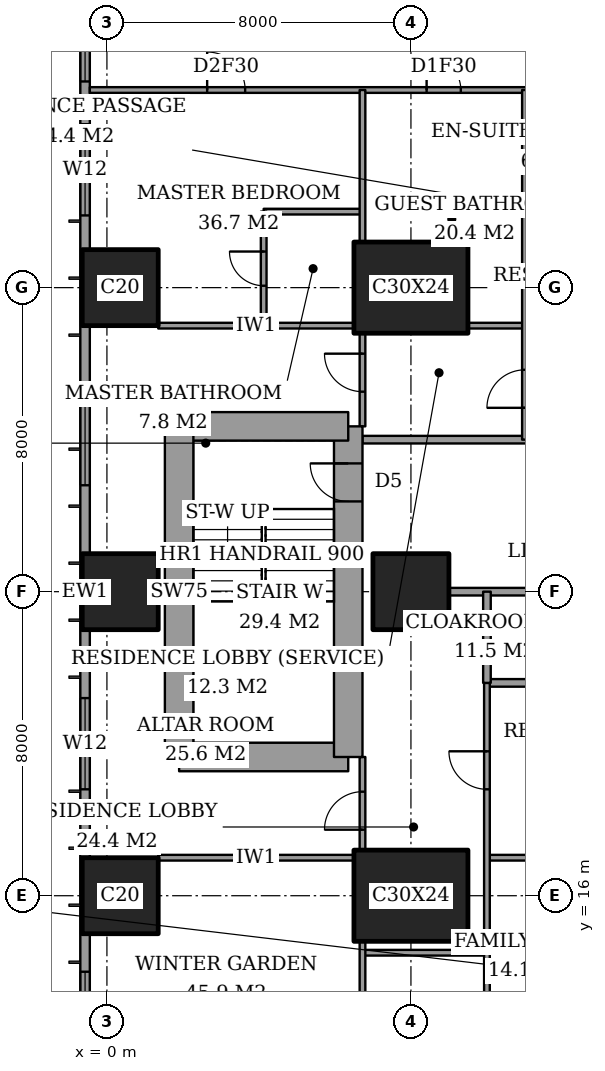
"""IFC4 building model, lengths in metres.
Left out: names, types, materials, properties, quantities, classifications, styles, units other than length and angle.
Written with IfcOpenShell. Run it as: python <this file> out.ifc"""

import sys

from ifc_helpers import new_model, si_unit, direction, frame, frame_2d, origin, origin_2d, place, context, subcontext, project, spatial, rectangle, extrude, element, fill, save


model = new_model("IFC4")
c1 = context("Model", 3, precision=1e-05, world=origin(), true_north=direction((0.0, 1.0)))
c2 = subcontext(c1, "Body", "Model", "MODEL_VIEW")
j1 = project(units=[si_unit("LENGTHUNIT", "METRE"), si_unit("PLANEANGLEUNIT", "RADIAN")], contexts=[c1])
p1 = place(None, origin())
s1 = spatial("IfcSite", under=j1, at=p1, CompositionType="ELEMENT")
p2 = place(p1, origin())
s2 = spatial("IfcBuilding", under=s1, at=p2, CompositionType="ELEMENT")
p3 = place(p2, frame((0.0, 0.0, 128.6)))
s3 = spatial("IfcBuildingStorey", under=s2, at=p3, CompositionType="ELEMENT", Elevation=128.6)
for number, where, z_axis, x_axis in (
    (1, (0.35, 16.0, 0.0), (0.0, 0.0, 1.0), (1.0, 0.0, 0.0)),
    (2, (0.35, 24.0, 0.0), (0.0, 0.0, 1.0), (1.0, 0.0, 0.0)),
    (3, (0.35, 32.0, 0.0), (0.0, 0.0, 1.0), (1.0, 0.0, 0.0)),
):
    element("IfcColumn", number, at=place(p3, frame(where, z_axis=z_axis, x_axis=x_axis)), inside=s3, PredefinedType="COLUMN", context=c2, shape_type="SweptSolid", body=[
        extrude(rectangle(XDim=2.0, YDim=2.0, at=origin_2d()), origin(), (0.0, 0.0, 1.0), 3.6),
    ])
p4 = place(p3, frame((8.0, 16.0, 0.0), z_axis=(0.0, 0.0, 1.0), x_axis=(1.0, 0.0, 0.0)))
e4 = element("IfcColumn", 4, at=p4, inside=s3, PredefinedType="COLUMN", context=c2, shape_type="SweptSolid", body=[
    extrude(rectangle(XDim=3.0, YDim=2.4, at=origin_2d()), origin(), (0.0, 0.0, 1.0), 3.6),
])
p5 = place(p3, frame((8.0, 24.0, 0.0), z_axis=(0.0, 0.0, 1.0), x_axis=(1.0, 0.0, 0.0)))
e5 = element("IfcColumn", 5, at=p5, inside=s3, PredefinedType="COLUMN", context=c2, shape_type="SweptSolid", body=[
    extrude(rectangle(XDim=2.0, YDim=2.0, at=origin_2d()), origin(), (0.0, 0.0, 1.0), 3.6),
])
p6 = place(p3, frame((8.0, 32.0, 0.0), z_axis=(0.0, 0.0, 1.0), x_axis=(1.0, 0.0, 0.0)))
e6 = element("IfcColumn", 6, at=p6, inside=s3, PredefinedType="COLUMN", context=c2, shape_type="SweptSolid", body=[
    extrude(rectangle(XDim=3.0, YDim=2.4, at=origin_2d()), origin(), (0.0, 0.0, 1.0), 3.6),
])
p7 = place(p3, frame((1.9, 19.65, 0.0), z_axis=(0.0, 0.0, 1.0), x_axis=(1.0, 0.0, 0.0)))
e7 = element("IfcWall", 7, at=p7, inside=s3, PredefinedType="SHEAR", context=c2, shape_type="SweptSolid", body=[
    extrude(rectangle(XDim=4.45, YDim=0.75, at=frame_2d((2.225, 0.0))), origin(), (0.0, 0.0, 1.0), 3.6),
])
p8 = place(p3, frame((6.35, 19.65, 0.0), z_axis=(0.0, 0.0, 1.0), x_axis=(0.0, 1.0, 0.0)))
e8 = element("IfcWall", 8, at=p8, inside=s3, PredefinedType="SHEAR", context=c2, shape_type="SweptSolid", body=[
    extrude(rectangle(XDim=8.7, YDim=0.75, at=frame_2d((4.35, 0.0))), origin(), (0.0, 0.0, 1.0), 3.6),
])
p9 = place(p8, frame((6.725, 0.0, 0.0)))
e9 = element("IfcOpeningElement", 9, at=p9, cuts=e8, PredefinedType="OPENING", context=c2, shape_type="SweptSolid", body=[
    extrude(rectangle(XDim=1.0, YDim=2.1, at=frame_2d((0.5, 1.05))), frame((0.0, 0.385, 0.0), z_axis=(0.0, -1.0, 0.0), x_axis=(1.0, 0.0, 0.0)), (0.0, 0.0, 1.0), 0.77),
])
p10 = place(p3, frame((6.35, 28.35, 0.0), z_axis=(0.0, 0.0, 1.0), x_axis=(-1.0, 0.0, 0.0)))
e10 = element("IfcWall", 10, at=p10, inside=s3, PredefinedType="SHEAR", context=c2, shape_type="SweptSolid", body=[
    extrude(rectangle(XDim=4.45, YDim=0.75, at=frame_2d((2.225, 0.0))), origin(), (0.0, 0.0, 1.0), 3.6),
])
p11 = place(p3, frame((1.9, 28.35, 0.0), z_axis=(0.0, 0.0, 1.0), x_axis=(0.0, -1.0, 0.0)))
e11 = element("IfcWall", 11, at=p11, inside=s3, PredefinedType="SHEAR", context=c2, shape_type="SweptSolid", body=[
    extrude(rectangle(XDim=8.7, YDim=0.75, at=frame_2d((4.35, 0.0))), origin(), (0.0, 0.0, 1.0), 3.6),
])
p12 = place(p3, frame((-0.575, 44.825, 0.0), z_axis=(0.0, 0.0, 1.0), x_axis=(0.0, -1.0, 0.0)))
e12 = element("IfcWall", 12, at=p12, inside=s3, PredefinedType="SOLIDWALL", context=c2, shape_type="SweptSolid", body=[
    extrude(rectangle(XDim=41.65, YDim=0.25, at=frame_2d((20.825, 0.0))), origin(), (0.0, 0.0, 1.0), 3.6),
])
p13 = place(p12, frame((0.775, 0.0, 0.4)))
e13 = element("IfcOpeningElement", 13, at=p13, cuts=e12, PredefinedType="OPENING", context=c2, shape_type="SweptSolid", body=[
    extrude(rectangle(XDim=2.4, YDim=2.2, at=frame_2d((1.2, 1.1))), frame((0.0, 0.135, 0.0), z_axis=(0.0, -1.0, 0.0), x_axis=(1.0, 0.0, 0.0)), (0.0, 0.0, 1.0), 0.27),
])
p14 = place(p12, frame((6.2, 0.0, 0.4)))
e14 = element("IfcOpeningElement", 14, at=p14, cuts=e12, PredefinedType="OPENING", context=c2, shape_type="SweptSolid", body=[
    extrude(rectangle(XDim=1.2, YDim=2.2, at=frame_2d((0.6, 1.1))), frame((0.0, 0.135, 0.0), z_axis=(0.0, -1.0, 0.0), x_axis=(1.0, 0.0, 0.0)), (0.0, 0.0, 1.0), 0.27),
])
p15 = place(p12, frame((8.525, 0.0, 0.4)))
e15 = element("IfcOpeningElement", 15, at=p15, cuts=e12, PredefinedType="OPENING", context=c2, shape_type="SweptSolid", body=[
    extrude(rectangle(XDim=2.4, YDim=2.2, at=frame_2d((1.2, 1.1))), frame((0.0, 0.135, 0.0), z_axis=(0.0, -1.0, 0.0), x_axis=(1.0, 0.0, 0.0)), (0.0, 0.0, 1.0), 0.27),
])
p16 = place(p12, frame((15.625, 0.0, 0.4)))
e16 = element("IfcOpeningElement", 16, at=p16, cuts=e12, PredefinedType="OPENING", context=c2, shape_type="SweptSolid", body=[
    extrude(rectangle(XDim=2.4, YDim=2.2, at=frame_2d((1.2, 1.1))), frame((0.0, 0.135, 0.0), z_axis=(0.0, -1.0, 0.0), x_axis=(1.0, 0.0, 0.0)), (0.0, 0.0, 1.0), 0.27),
])
p17 = place(p12, frame((23.625, 0.0, 0.4)))
e17 = element("IfcOpeningElement", 17, at=p17, cuts=e12, PredefinedType="OPENING", context=c2, shape_type="SweptSolid", body=[
    extrude(rectangle(XDim=2.4, YDim=2.2, at=frame_2d((1.2, 1.1))), frame((0.0, 0.135, 0.0), z_axis=(0.0, -1.0, 0.0), x_axis=(1.0, 0.0, 0.0)), (0.0, 0.0, 1.0), 0.27),
])
p18 = place(p12, frame((30.825, 0.0, 0.4)))
e18 = element("IfcOpeningElement", 18, at=p18, cuts=e12, PredefinedType="OPENING", context=c2, shape_type="SweptSolid", body=[
    extrude(rectangle(XDim=2.4, YDim=2.2, at=frame_2d((1.2, 1.1))), frame((0.0, 0.135, 0.0), z_axis=(0.0, -1.0, 0.0), x_axis=(1.0, 0.0, 0.0)), (0.0, 0.0, 1.0), 0.27),
])
p19 = place(p12, frame((34.5, 0.0, 0.4)))
e19 = element("IfcOpeningElement", 19, at=p19, cuts=e12, PredefinedType="OPENING", context=c2, shape_type="SweptSolid", body=[
    extrude(rectangle(XDim=1.2, YDim=2.2, at=frame_2d((0.6, 1.1))), frame((0.0, 0.135, 0.0), z_axis=(0.0, -1.0, 0.0), x_axis=(1.0, 0.0, 0.0)), (0.0, 0.0, 1.0), 0.27),
])
p20 = place(p12, frame((38.475, 0.0, 0.4)))
e20 = element("IfcOpeningElement", 20, at=p20, cuts=e12, PredefinedType="OPENING", context=c2, shape_type="SweptSolid", body=[
    extrude(rectangle(XDim=2.4, YDim=2.2, at=frame_2d((1.2, 1.1))), frame((0.0, 0.135, 0.0), z_axis=(0.0, -1.0, 0.0), x_axis=(1.0, 0.0, 0.0)), (0.0, 0.0, 1.0), 0.27),
])
p21 = place(p3, frame((6.725, 14.5, 0.0), z_axis=(0.0, 0.0, 1.0), x_axis=(1.0, 0.0, 0.0)))
e21 = element("IfcWall", 21, at=p21, inside=s3, PredefinedType="PARTITIONING", context=c2, shape_type="SweptSolid", body=[
    extrude(rectangle(XDim=3.275, YDim=0.15, at=frame_2d((1.637, 0.0))), origin(), (0.0, 0.0, 1.0), 3.35),
])
p22 = place(p3, frame((1.35, 17.0, 0.0), z_axis=(0.0, 0.0, 1.0), x_axis=(1.0, 0.0, 0.0)))
e22 = element("IfcWall", 22, at=p22, inside=s3, PredefinedType="PARTITIONING", context=c2, shape_type="SweptSolid", body=[
    extrude(rectangle(XDim=5.15, YDim=0.15, at=frame_2d((2.575, 0.0))), origin(), (0.0, 0.0, 1.0), 3.35),
])
p23 = place(p3, frame((10.0, 17.0, 0.0), z_axis=(0.0, 0.0, 1.0), x_axis=(1.0, 0.0, 0.0)))
e23 = element("IfcWall", 23, at=p23, inside=s3, PredefinedType="PARTITIONING", context=c2, shape_type="SweptSolid", body=[
    extrude(rectangle(XDim=4.4, YDim=0.15, at=frame_2d((2.2, 0.0))), origin(), (0.0, 0.0, 1.0), 3.35),
])
p24 = place(p23, frame((2.8, 0.0, 0.0)))
e24 = element("IfcOpeningElement", 24, at=p24, cuts=e23, PredefinedType="OPENING", context=c2, shape_type="SweptSolid", body=[
    extrude(rectangle(XDim=1.0, YDim=2.1, at=frame_2d((0.5, 1.05))), frame((0.0, 0.085, 0.0), z_axis=(0.0, -1.0, 0.0), x_axis=(1.0, 0.0, 0.0)), (0.0, 0.0, 1.0), 0.17),
])
p25 = place(p3, frame((10.0, 21.6, 0.0), z_axis=(0.0, 0.0, 1.0), x_axis=(1.0, 0.0, 0.0)))
e25 = element("IfcWall", 25, at=p25, inside=s3, PredefinedType="PARTITIONING", context=c2, shape_type="SweptSolid", body=[
    extrude(rectangle(XDim=4.8, YDim=0.2, at=frame_2d((2.4, 0.0))), origin(), (0.0, 0.0, 1.0), 3.35),
])
p26 = place(p25, frame((1.95, 0.0, 0.0)))
e26 = element("IfcOpeningElement", 26, at=p26, cuts=e25, PredefinedType="OPENING", context=c2, shape_type="SweptSolid", body=[
    extrude(rectangle(XDim=0.9, YDim=2.1, at=frame_2d((0.45, 1.05))), frame((0.0, 0.11, 0.0), z_axis=(0.0, -1.0, 0.0), x_axis=(1.0, 0.0, 0.0)), (0.0, 0.0, 1.0), 0.22),
])
p27 = place(p3, frame((9.0, 24.0, 0.0), z_axis=(0.0, 0.0, 1.0), x_axis=(1.0, 0.0, 0.0)))
e27 = element("IfcWall", 27, at=p27, inside=s3, PredefinedType="PARTITIONING", context=c2, shape_type="SweptSolid", body=[
    extrude(rectangle(XDim=6.0, YDim=0.2, at=frame_2d((3.0, 0.0))), origin(), (0.0, 0.0, 1.0), 3.35),
])
p28 = place(p3, frame((6.725, 28.0, 0.0), z_axis=(0.0, 0.0, 1.0), x_axis=(1.0, 0.0, 0.0)))
e28 = element("IfcWall", 28, at=p28, inside=s3, PredefinedType="PARTITIONING", context=c2, shape_type="SweptSolid", body=[
    extrude(rectangle(XDim=17.275, YDim=0.2, at=frame_2d((8.637, 0.0))), origin(), (0.0, 0.0, 1.0), 3.35),
])
p29 = place(p28, frame((7.175, 0.0, 0.0)))
e29 = element("IfcOpeningElement", 29, at=p29, cuts=e28, PredefinedType="OPENING", context=c2, shape_type="SweptSolid", body=[
    extrude(rectangle(XDim=1.2, YDim=2.4, at=frame_2d((0.6, 1.2))), frame((0.0, 0.11, 0.0), z_axis=(0.0, -1.0, 0.0), x_axis=(1.0, 0.0, 0.0)), (0.0, 0.0, 1.0), 0.22),
])
p30 = place(p3, frame((1.35, 31.0, 0.0), z_axis=(0.0, 0.0, 1.0), x_axis=(1.0, 0.0, 0.0)))
e30 = element("IfcWall", 30, at=p30, inside=s3, PredefinedType="PARTITIONING", context=c2, shape_type="SweptSolid", body=[
    extrude(rectangle(XDim=5.15, YDim=0.15, at=frame_2d((2.575, 0.0))), origin(), (0.0, 0.0, 1.0), 3.35),
])
p31 = place(p3, frame((9.5, 31.0, 0.0), z_axis=(0.0, 0.0, 1.0), x_axis=(1.0, 0.0, 0.0)))
e31 = element("IfcWall", 31, at=p31, inside=s3, PredefinedType="PARTITIONING", context=c2, shape_type="SweptSolid", body=[
    extrude(rectangle(XDim=1.5, YDim=0.15, at=frame_2d((0.75, 0.0))), origin(), (0.0, 0.0, 1.0), 3.35),
])
p32 = place(p3, frame((4.125, 34.0, 0.0), z_axis=(0.0, 0.0, 1.0), x_axis=(1.0, 0.0, 0.0)))
e32 = element("IfcWall", 32, at=p32, inside=s3, PredefinedType="PARTITIONING", context=c2, shape_type="SweptSolid", body=[
    extrude(rectangle(XDim=2.6, YDim=0.15, at=frame_2d((1.3, 0.0))), origin(), (0.0, 0.0, 1.0), 3.35),
])
p33 = place(p3, frame((-0.45, 37.2, 0.0), z_axis=(0.0, 0.0, 1.0), x_axis=(1.0, 0.0, 0.0)))
e33 = element("IfcWall", 33, at=p33, inside=s3, PredefinedType="PARTITIONING", context=c2, shape_type="SweptSolid", body=[
    extrude(rectangle(XDim=25.011, YDim=0.15, at=frame_2d((12.505, 0.0))), origin(), (0.0, 0.0, 1.0), 3.35),
])
p34 = place(p33, frame((12.05, 0.0, 0.0)))
e34 = element("IfcOpeningElement", 34, at=p34, cuts=e33, PredefinedType="OPENING", context=c2, shape_type="SweptSolid", body=[
    extrude(rectangle(XDim=1.0, YDim=2.1, at=frame_2d((0.5, 1.05))), frame((0.0, 0.085, 0.0), z_axis=(0.0, -1.0, 0.0), x_axis=(1.0, 0.0, 0.0)), (0.0, 0.0, 1.0), 0.17),
])
p35 = place(p33, frame((3.087, 0.0, 0.0)))
e35 = element("IfcOpeningElement", 35, at=p35, cuts=e33, PredefinedType="OPENING", context=c2, shape_type="SweptSolid", body=[
    extrude(rectangle(XDim=1.0, YDim=2.1, at=frame_2d((0.5, 1.05))), frame((0.0, 0.085, 0.0), z_axis=(0.0, -1.0, 0.0), x_axis=(1.0, 0.0, 0.0)), (0.0, 0.0, 1.0), 0.17),
])
p36 = place(p33, frame((8.863, 0.0, 0.0)))
e36 = element("IfcOpeningElement", 36, at=p36, cuts=e33, PredefinedType="OPENING", context=c2, shape_type="SweptSolid", body=[
    extrude(rectangle(XDim=0.9, YDim=2.1, at=frame_2d((0.45, 1.05))), frame((0.0, 0.085, 0.0), z_axis=(0.0, -1.0, 0.0), x_axis=(1.0, 0.0, 0.0)), (0.0, 0.0, 1.0), 0.17),
])
p37 = place(p33, frame((15.55, 0.0, 0.0)))
e37 = element("IfcOpeningElement", 37, at=p37, cuts=e33, PredefinedType="OPENING", context=c2, shape_type="SweptSolid", body=[
    extrude(rectangle(XDim=1.0, YDim=2.1, at=frame_2d((0.5, 1.05))), frame((0.0, 0.085, 0.0), z_axis=(0.0, -1.0, 0.0), x_axis=(1.0, 0.0, 0.0)), (0.0, 0.0, 1.0), 0.17),
])
p38 = place(p33, frame((21.175, 0.0, 0.0)))
e38 = element("IfcOpeningElement", 38, at=p38, cuts=e33, PredefinedType="OPENING", context=c2, shape_type="SweptSolid", body=[
    extrude(rectangle(XDim=1.0, YDim=2.1, at=frame_2d((0.5, 1.05))), frame((0.0, 0.085, 0.0), z_axis=(0.0, -1.0, 0.0), x_axis=(1.0, 0.0, 0.0)), (0.0, 0.0, 1.0), 0.17),
])
p39 = place(p3, frame((4.125, 31.0, 0.0), z_axis=(0.0, 0.0, 1.0), x_axis=(0.0, 1.0, 0.0)))
e39 = element("IfcWall", 39, at=p39, inside=s3, PredefinedType="PARTITIONING", context=c2, shape_type="SweptSolid", body=[
    extrude(rectangle(XDim=3.0, YDim=0.15, at=frame_2d((1.5, 0.0))), origin(), (0.0, 0.0, 1.0), 3.35),
])
p40 = place(p39, frame((1.05, 0.0, 0.0)))
e40 = element("IfcOpeningElement", 40, at=p40, cuts=e39, PredefinedType="OPENING", context=c2, shape_type="SweptSolid", body=[
    extrude(rectangle(XDim=0.9, YDim=2.1, at=frame_2d((0.45, 1.05))), frame((0.0, 0.085, 0.0), z_axis=(0.0, -1.0, 0.0), x_axis=(1.0, 0.0, 0.0)), (0.0, 0.0, 1.0), 0.17),
])
p41 = place(p3, frame((6.725, 10.6, 0.0), z_axis=(0.0, 0.0, 1.0), x_axis=(0.0, 1.0, 0.0)))
e41 = element("IfcWall", 41, at=p41, inside=s3, PredefinedType="PARTITIONING", context=c2, shape_type="SweptSolid", body=[
    extrude(rectangle(XDim=4.2, YDim=0.15, at=frame_2d((2.1, 0.0))), origin(), (0.0, 0.0, 1.0), 3.35),
])
p42 = place(p3, frame((6.725, 17.2, 0.0), z_axis=(0.0, 0.0, 1.0), x_axis=(0.0, 1.0, 0.0)))
e42 = element("IfcWall", 42, at=p42, inside=s3, PredefinedType="PARTITIONING", context=c2, shape_type="SweptSolid", body=[
    extrude(rectangle(XDim=2.45, YDim=0.15, at=frame_2d((1.225, 0.0))), origin(), (0.0, 0.0, 1.0), 3.35),
])
p43 = place(p42, frame((0.538, 0.0, 0.0)))
e43 = element("IfcOpeningElement", 43, at=p43, cuts=e42, PredefinedType="OPENING", context=c2, shape_type="SweptSolid", body=[
    extrude(rectangle(XDim=1.0, YDim=2.1, at=frame_2d((0.5, 1.05))), frame((0.0, 0.085, 0.0), z_axis=(0.0, -1.0, 0.0), x_axis=(1.0, 0.0, 0.0)), (0.0, 0.0, 1.0), 0.17),
])
p44 = place(p3, frame((6.725, 28.35, 0.0), z_axis=(0.0, 0.0, 1.0), x_axis=(0.0, 1.0, 0.0)))
e44 = element("IfcWall", 44, at=p44, inside=s3, PredefinedType="PARTITIONING", context=c2, shape_type="SweptSolid", body=[
    extrude(rectangle(XDim=2.45, YDim=0.15, at=frame_2d((1.225, 0.0))), origin(), (0.0, 0.0, 1.0), 3.35),
])
p45 = place(p44, frame((0.913, 0.0, 0.0)))
e45 = element("IfcOpeningElement", 45, at=p45, cuts=e44, PredefinedType="OPENING", context=c2, shape_type="SweptSolid", body=[
    extrude(rectangle(XDim=1.0, YDim=2.1, at=frame_2d((0.5, 1.05))), frame((0.0, 0.085, 0.0), z_axis=(0.0, -1.0, 0.0), x_axis=(1.0, 0.0, 0.0)), (0.0, 0.0, 1.0), 0.17),
])
p46 = place(p3, frame((6.725, 33.2, 0.0), z_axis=(0.0, 0.0, 1.0), x_axis=(0.0, 1.0, 0.0)))
e46 = element("IfcWall", 46, at=p46, inside=s3, PredefinedType="PARTITIONING", context=c2, shape_type="SweptSolid", body=[
    extrude(rectangle(XDim=4.0, YDim=0.15, at=frame_2d((2.0, 0.0))), origin(), (0.0, 0.0, 1.0), 3.35),
])
p47 = place(p3, frame((10.0, 21.6, 0.0), z_axis=(0.0, 0.0, 1.0), x_axis=(0.0, 1.0, 0.0)))
e47 = element("IfcWall", 47, at=p47, inside=s3, PredefinedType="PARTITIONING", context=c2, shape_type="SweptSolid", body=[
    extrude(rectangle(XDim=2.4, YDim=0.2, at=frame_2d((1.2, 0.0))), origin(), (0.0, 0.0, 1.0), 3.35),
])
p48 = place(p3, frame((10.0, 10.6, 0.0), z_axis=(0.0, 0.0, 1.0), x_axis=(0.0, 1.0, 0.0)))
e48 = element("IfcWall", 48, at=p48, inside=s3, PredefinedType="PARTITIONING", context=c2, shape_type="SweptSolid", body=[
    extrude(rectangle(XDim=11.0, YDim=0.15, at=frame_2d((5.5, 0.0))), origin(), (0.0, 0.0, 1.0), 3.35),
])
p49 = place(p48, frame((8.2, 0.0, 0.0)))
e49 = element("IfcOpeningElement", 49, at=p49, cuts=e48, PredefinedType="OPENING", context=c2, shape_type="SweptSolid", body=[
    extrude(rectangle(XDim=1.0, YDim=2.1, at=frame_2d((0.5, 1.05))), frame((0.0, 0.085, 0.0), z_axis=(0.0, -1.0, 0.0), x_axis=(1.0, 0.0, 0.0)), (0.0, 0.0, 1.0), 0.17),
])
p50 = place(p3, frame((11.0, 28.0, 0.0), z_axis=(0.0, 0.0, 1.0), x_axis=(0.0, 1.0, 0.0)))
e50 = element("IfcWall", 50, at=p50, inside=s3, PredefinedType="PARTITIONING", context=c2, shape_type="SweptSolid", body=[
    extrude(rectangle(XDim=9.2, YDim=0.15, at=frame_2d((4.6, 0.0))), origin(), (0.0, 0.0, 1.0), 3.35),
])
p51 = place(p50, frame((0.837, 0.0, 0.0)))
e51 = element("IfcOpeningElement", 51, at=p51, cuts=e50, PredefinedType="OPENING", context=c2, shape_type="SweptSolid", body=[
    extrude(rectangle(XDim=1.0, YDim=2.1, at=frame_2d((0.5, 1.05))), frame((0.0, 0.085, 0.0), z_axis=(0.0, -1.0, 0.0), x_axis=(1.0, 0.0, 0.0)), (0.0, 0.0, 1.0), 0.17),
])
p52 = place(p14, origin())
e52 = element("IfcWindow", 52, at=p52, inside=s3, PartitioningType="SINGLE_PANEL", PredefinedType="WINDOW", context=c2, shape_type="SweptSolid", body=[
    extrude(rectangle(XDim=1.2, YDim=2.2, at=frame_2d((0.6, 1.1))), frame((0.0, 0.03, 0.0), z_axis=(0.0, -1.0, 0.0), x_axis=(1.0, 0.0, 0.0)), (0.0, 0.0, 1.0), 0.06),
])
fill(e14, e52)
p53 = place(p15, origin())
e53 = element("IfcWindow", 53, at=p53, inside=s3, PartitioningType="SINGLE_PANEL", PredefinedType="WINDOW", context=c2, shape_type="SweptSolid", body=[
    extrude(rectangle(XDim=2.4, YDim=2.2, at=frame_2d((1.2, 1.1))), frame((0.0, 0.03, 0.0), z_axis=(0.0, -1.0, 0.0), x_axis=(1.0, 0.0, 0.0)), (0.0, 0.0, 1.0), 0.06),
])
fill(e15, e53)
p54 = place(p16, origin())
e54 = element("IfcWindow", 54, at=p54, inside=s3, PartitioningType="SINGLE_PANEL", PredefinedType="WINDOW", context=c2, shape_type="SweptSolid", body=[
    extrude(rectangle(XDim=2.4, YDim=2.2, at=frame_2d((1.2, 1.1))), frame((0.0, 0.03, 0.0), z_axis=(0.0, -1.0, 0.0), x_axis=(1.0, 0.0, 0.0)), (0.0, 0.0, 1.0), 0.06),
])
fill(e16, e54)
p55 = place(p17, origin())
e55 = element("IfcWindow", 55, at=p55, inside=s3, PartitioningType="SINGLE_PANEL", PredefinedType="WINDOW", context=c2, shape_type="SweptSolid", body=[
    extrude(rectangle(XDim=2.4, YDim=2.2, at=frame_2d((1.2, 1.1))), frame((0.0, 0.03, 0.0), z_axis=(0.0, -1.0, 0.0), x_axis=(1.0, 0.0, 0.0)), (0.0, 0.0, 1.0), 0.06),
])
fill(e17, e55)
p56 = place(p18, origin())
e56 = element("IfcWindow", 56, at=p56, inside=s3, PartitioningType="SINGLE_PANEL", PredefinedType="WINDOW", context=c2, shape_type="SweptSolid", body=[
    extrude(rectangle(XDim=2.4, YDim=2.2, at=frame_2d((1.2, 1.1))), frame((0.0, 0.03, 0.0), z_axis=(0.0, -1.0, 0.0), x_axis=(1.0, 0.0, 0.0)), (0.0, 0.0, 1.0), 0.06),
])
fill(e18, e56)
p57 = place(p43, origin())
e57 = element("IfcDoor", 57, at=p57, inside=s3, OperationType="SINGLE_SWING_RIGHT", PredefinedType="DOOR", context=c2, shape_type="SweptSolid", body=[
    extrude(rectangle(XDim=1.0, YDim=2.1, at=frame_2d((0.5, 1.05))), frame((0.0, 0.025, 0.0), z_axis=(0.0, -1.0, 0.0), x_axis=(1.0, 0.0, 0.0)), (0.0, 0.0, 1.0), 0.05),
])
fill(e43, e57)
p58 = place(p49, origin())
e58 = element("IfcDoor", 58, at=p58, inside=s3, OperationType="SINGLE_SWING_LEFT", PredefinedType="DOOR", context=c2, shape_type="SweptSolid", body=[
    extrude(rectangle(XDim=1.0, YDim=2.1, at=frame_2d((0.5, 1.05))), frame((0.0, 0.025, 0.0), z_axis=(0.0, -1.0, 0.0), x_axis=(1.0, 0.0, 0.0)), (0.0, 0.0, 1.0), 0.05),
])
fill(e49, e58)
p59 = place(p40, origin())
e59 = element("IfcDoor", 59, at=p59, inside=s3, OperationType="SINGLE_SWING_LEFT", PredefinedType="DOOR", context=c2, shape_type="SweptSolid", body=[
    extrude(rectangle(XDim=0.9, YDim=2.1, at=frame_2d((0.45, 1.05))), frame((0.0, 0.025, 0.0), z_axis=(0.0, -1.0, 0.0), x_axis=(1.0, 0.0, 0.0)), (0.0, 0.0, 1.0), 0.05),
])
fill(e40, e59)
p60 = place(p35, origin())
e60 = element("IfcDoor", 60, at=p60, inside=s3, OperationType="SINGLE_SWING_RIGHT", PredefinedType="DOOR", context=c2, shape_type="SweptSolid", body=[
    extrude(rectangle(XDim=1.0, YDim=2.1, at=frame_2d((0.5, 1.05))), frame((0.0, 0.025, 0.0), z_axis=(0.0, -1.0, 0.0), x_axis=(1.0, 0.0, 0.0)), (0.0, 0.0, 1.0), 0.05),
])
fill(e35, e60)
p61 = place(p45, origin())
e61 = element("IfcDoor", 61, at=p61, inside=s3, OperationType="SINGLE_SWING_LEFT", PredefinedType="DOOR", context=c2, shape_type="SweptSolid", body=[
    extrude(rectangle(XDim=1.0, YDim=2.1, at=frame_2d((0.5, 1.05))), frame((0.0, 0.025, 0.0), z_axis=(0.0, -1.0, 0.0), x_axis=(1.0, 0.0, 0.0)), (0.0, 0.0, 1.0), 0.05),
])
fill(e45, e61)
p62 = place(p36, origin())
e62 = element("IfcDoor", 62, at=p62, inside=s3, OperationType="SINGLE_SWING_RIGHT", PredefinedType="DOOR", context=c2, shape_type="SweptSolid", body=[
    extrude(rectangle(XDim=0.9, YDim=2.1, at=frame_2d((0.45, 1.05))), frame((0.0, 0.025, 0.0), z_axis=(0.0, -1.0, 0.0), x_axis=(1.0, 0.0, 0.0)), (0.0, 0.0, 1.0), 0.05),
])
fill(e36, e62)
p63 = place(p51, origin())
e63 = element("IfcDoor", 63, at=p63, inside=s3, OperationType="SINGLE_SWING_RIGHT", PredefinedType="DOOR", context=c2, shape_type="SweptSolid", body=[
    extrude(rectangle(XDim=1.0, YDim=2.1, at=frame_2d((0.5, 1.05))), frame((0.0, 0.025, 0.0), z_axis=(0.0, -1.0, 0.0), x_axis=(1.0, 0.0, 0.0)), (0.0, 0.0, 1.0), 0.05),
])
fill(e51, e63)
p64 = place(p9, origin())
e64 = element("IfcDoor", 64, at=p64, inside=s3, OperationType="SINGLE_SWING_LEFT", PredefinedType="DOOR", context=c2, shape_type="SweptSolid", body=[
    extrude(rectangle(XDim=1.0, YDim=2.1, at=frame_2d((0.5, 1.05))), frame((0.0, 0.025, 0.0), z_axis=(0.0, -1.0, 0.0), x_axis=(1.0, 0.0, 0.0)), (0.0, 0.0, 1.0), 0.05),
])
fill(e9, e64)
save(model, sys.argv[1])
